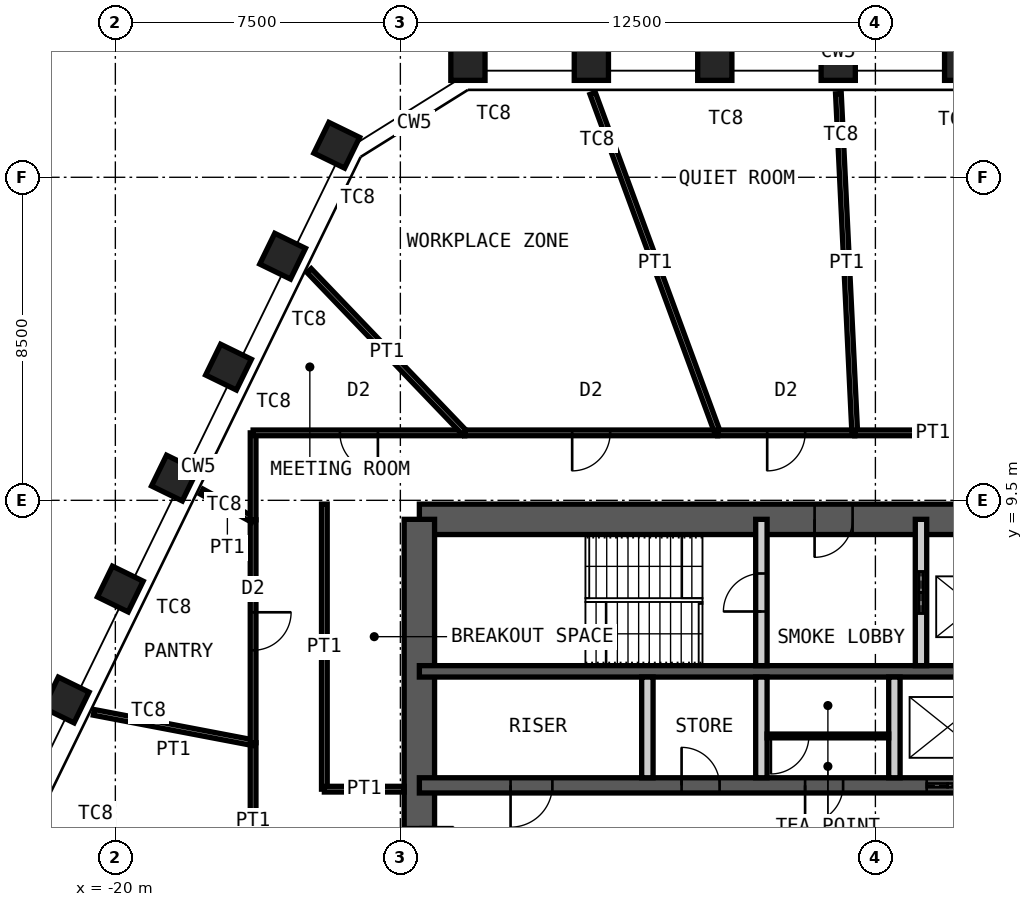
"""IFC4 building model, lengths in metres.
Left out: names, types, materials, properties, quantities, classifications, styles, units other than length and angle.
Written with IfcOpenShell. Run it as: python <this file> out.ifc"""

import sys

from ifc_helpers import new_model, si_unit, direction, frame, frame_2d, origin, origin_2d, place, context, subcontext, project, spatial, rectangle, hollow_rectangle, extrude, element, fill, save


model = new_model("IFC4")
c1 = context("Model", 3, precision=1e-05, world=origin(), true_north=direction((0.0, 1.0)))
c2 = subcontext(c1, "Body", "Model", "MODEL_VIEW")
j1 = project(units=[si_unit("LENGTHUNIT", "METRE"), si_unit("PLANEANGLEUNIT", "RADIAN")], contexts=[c1])
p1 = place(None, origin())
s1 = spatial("IfcSite", under=j1, at=p1, CompositionType="ELEMENT")
p2 = place(p1, origin())
s2 = spatial("IfcBuilding", under=s1, at=p2, CompositionType="ELEMENT")
p3 = place(p2, frame((0.0, 0.0, 304.0)))
s3 = spatial("IfcBuildingStorey", under=s2, at=p3, CompositionType="ELEMENT", Elevation=304.0)
for number, where, z_axis, x_axis in (
    (1, (-10.722, 21.0, 0.0), (0.0, 0.0, 1.0), (-1.0, 0.0, 0.0)),
    (2, (-7.474, 21.0, 0.0), (0.0, 0.0, 1.0), (-1.0, 0.0, 0.0)),
    (3, (-4.226, 21.0, 0.0), (0.0, 0.0, 1.0), (-1.0, 0.0, 0.0)),
    (4, (-0.978, 21.0, 0.0), (0.0, 0.0, 1.0), (-1.0, 0.0, 0.0)),
    (5, (2.27, 21.0, 0.0), (0.0, 0.0, 1.0), (-1.0, 0.0, 0.0)),
    (6, (-21.293, 4.246, 0.0), (0.0, 0.0, 1.0), (-0.438, -0.899, 0.0)),
    (7, (-19.87, 7.166, 0.0), (0.0, 0.0, 1.0), (-0.438, -0.899, 0.0)),
    (8, (-18.446, 10.085, 0.0), (0.0, 0.0, 1.0), (-0.438, -0.899, 0.0)),
    (9, (-17.022, 13.004, 0.0), (0.0, 0.0, 1.0), (-0.438, -0.899, 0.0)),
    (10, (-15.598, 15.924, 0.0), (0.0, 0.0, 1.0), (-0.438, -0.899, 0.0)),
    (11, (-14.174, 18.843, 0.0), (0.0, 0.0, 1.0), (-0.438, -0.899, 0.0)),
):
    element("IfcColumn", number, at=place(p3, frame(where, z_axis=z_axis, x_axis=x_axis)), inside=s3, PredefinedType="COLUMN", context=c2, shape_type="SweptSolid", body=[
        extrude(hollow_rectangle(XDim=0.9, YDim=0.9, WallThickness=0.05, at=origin_2d()), origin(), (0.0, 0.0, 1.0), 4.2),
    ])
p4 = place(p3, frame((-12.0, 9.0, 0.0), z_axis=(0.0, 0.0, 1.0), x_axis=(1.0, 0.0, 0.0)))
e12 = element("IfcWall", 12, at=p4, inside=s3, PredefinedType="SHEAR", context=c2, shape_type="SweptSolid", body=[
    extrude(rectangle(XDim=24.0, YDim=0.8, at=frame_2d((12.0, 0.0))), origin(), (0.0, 0.0, 1.0), 4.2),
])
p5 = place(p4, frame((10.4, 0.0, 0.0)))
e13 = element("IfcOpeningElement", 13, at=p5, cuts=e12, PredefinedType="OPENING", context=c2, shape_type="SweptSolid", body=[
    extrude(rectangle(XDim=1.0, YDim=2.1, at=frame_2d((0.5, 1.05))), frame((0.0, 0.41, 0.0), z_axis=(0.0, -1.0, 0.0), x_axis=(1.0, 0.0, 0.0)), (0.0, 0.0, 1.0), 0.82),
])
p6 = place(p4, frame((17.6, 0.0, 0.0)))
e14 = element("IfcOpeningElement", 14, at=p6, cuts=e12, PredefinedType="OPENING", context=c2, shape_type="SweptSolid", body=[
    extrude(rectangle(XDim=0.9, YDim=2.1, at=frame_2d((0.45, 1.05))), frame((0.0, 0.41, 0.0), z_axis=(0.0, -1.0, 0.0), x_axis=(1.0, 0.0, 0.0)), (0.0, 0.0, 1.0), 0.82),
])
p7 = place(p4, frame((21.9, 0.0, 0.0)))
e15 = element("IfcOpeningElement", 15, at=p7, cuts=e12, PredefinedType="OPENING", context=c2, shape_type="SweptSolid", body=[
    extrude(rectangle(XDim=0.9, YDim=2.1, at=frame_2d((0.45, 1.05))), frame((0.0, 0.41, 0.0), z_axis=(0.0, -1.0, 0.0), x_axis=(1.0, 0.0, 0.0)), (0.0, 0.0, 1.0), 0.82),
])
p8 = place(p3, frame((-12.0, -9.0, 0.0), z_axis=(0.0, 0.0, 1.0), x_axis=(0.0, 1.0, 0.0)))
e16 = element("IfcWall", 16, at=p8, inside=s3, PredefinedType="SHEAR", context=c2, shape_type="SweptSolid", body=[
    extrude(rectangle(XDim=18.0, YDim=0.8, at=frame_2d((9.0, 0.0))), origin(), (0.0, 0.0, 1.0), 4.2),
])
p9 = place(p8, frame((8.1, 0.0, 0.0)))
e17 = element("IfcOpeningElement", 17, at=p9, cuts=e16, PredefinedType="OPENING", context=c2, shape_type="SweptSolid", body=[
    extrude(rectangle(XDim=1.8, YDim=2.1, at=frame_2d((0.9, 1.05))), frame((0.0, 0.41, 0.0), z_axis=(0.0, -1.0, 0.0), x_axis=(1.0, 0.0, 0.0)), (0.0, 0.0, 1.0), 0.82),
])
p10 = place(p3, frame((-12.0, 5.0, 0.0), z_axis=(0.0, 0.0, 1.0), x_axis=(1.0, 0.0, 0.0)))
e18 = element("IfcWall", 18, at=p10, inside=s3, PredefinedType="SHEAR", context=c2, shape_type="SweptSolid", body=[
    extrude(rectangle(XDim=24.0, YDim=0.3, at=frame_2d((12.0, 0.0))), origin(), (0.0, 0.0, 1.0), 4.2),
])
p11 = place(p3, frame((-12.0, 2.0, 0.0), z_axis=(0.0, 0.0, 1.0), x_axis=(1.0, 0.0, 0.0)))
e19 = element("IfcWall", 19, at=p11, inside=s3, PredefinedType="SHEAR", context=c2, shape_type="SweptSolid", body=[
    extrude(rectangle(XDim=24.0, YDim=0.4, at=frame_2d((12.0, 0.0))), origin(), (0.0, 0.0, 1.0), 4.2),
])
p12 = place(p11, frame((2.4, 0.0, 0.0)))
e20 = element("IfcOpeningElement", 20, at=p12, cuts=e19, PredefinedType="OPENING", context=c2, shape_type="SweptSolid", body=[
    extrude(rectangle(XDim=1.1, YDim=2.1, at=frame_2d((0.55, 1.05))), frame((0.0, 0.21, 0.0), z_axis=(0.0, -1.0, 0.0), x_axis=(1.0, 0.0, 0.0)), (0.0, 0.0, 1.0), 0.42),
])
p13 = place(p11, frame((22.0, 0.0, 0.0)))
e21 = element("IfcOpeningElement", 21, at=p13, cuts=e19, PredefinedType="OPENING", context=c2, shape_type="SweptSolid", body=[
    extrude(rectangle(XDim=1.1, YDim=2.1, at=frame_2d((0.55, 1.05))), frame((0.0, 0.21, 0.0), z_axis=(0.0, -1.0, 0.0), x_axis=(1.0, 0.0, 0.0)), (0.0, 0.0, 1.0), 0.42),
])
p14 = place(p11, frame((10.15, 0.0, 0.0)))
e22 = element("IfcOpeningElement", 22, at=p14, cuts=e19, PredefinedType="OPENING", context=c2, shape_type="SweptSolid", body=[
    extrude(rectangle(XDim=1.0, YDim=2.1, at=frame_2d((0.5, 1.05))), frame((0.0, 0.21, 0.0), z_axis=(0.0, -1.0, 0.0), x_axis=(1.0, 0.0, 0.0)), (0.0, 0.0, 1.0), 0.42),
])
p15 = place(p11, frame((6.9, 0.0, 0.0)))
e23 = element("IfcOpeningElement", 23, at=p15, cuts=e19, PredefinedType="OPENING", context=c2, shape_type="SweptSolid", body=[
    extrude(rectangle(XDim=1.0, YDim=2.1, at=frame_2d((0.5, 1.05))), frame((0.0, 0.21, 0.0), z_axis=(0.0, -1.0, 0.0), x_axis=(1.0, 0.0, 0.0)), (0.0, 0.0, 1.0), 0.42),
])
p16 = place(p11, frame((13.35, 0.0, 0.0)))
e24 = element("IfcOpeningElement", 24, at=p16, cuts=e19, PredefinedType="OPENING", context=c2, shape_type="SweptSolid", body=[
    extrude(rectangle(XDim=1.1, YDim=2.4, at=frame_2d((0.55, 1.2))), frame((0.0, 0.21, 0.0), z_axis=(0.0, -1.0, 0.0), x_axis=(1.0, 0.0, 0.0)), (0.0, 0.0, 1.0), 0.42),
])
p17 = place(p11, frame((16.15, 0.0, 0.0)))
e25 = element("IfcOpeningElement", 25, at=p17, cuts=e19, PredefinedType="OPENING", context=c2, shape_type="SweptSolid", body=[
    extrude(rectangle(XDim=1.1, YDim=2.4, at=frame_2d((0.55, 1.2))), frame((0.0, 0.21, 0.0), z_axis=(0.0, -1.0, 0.0), x_axis=(1.0, 0.0, 0.0)), (0.0, 0.0, 1.0), 0.42),
])
p18 = place(p11, frame((19.0, 0.0, 0.0)))
e26 = element("IfcOpeningElement", 26, at=p18, cuts=e19, PredefinedType="OPENING", context=c2, shape_type="SweptSolid", body=[
    extrude(rectangle(XDim=1.0, YDim=2.1, at=frame_2d((0.5, 1.05))), frame((0.0, 0.21, 0.0), z_axis=(0.0, -1.0, 0.0), x_axis=(1.0, 0.0, 0.0)), (0.0, 0.0, 1.0), 0.42),
])
p19 = place(p3, frame((-3.0, 5.15, 0.0), z_axis=(0.0, 0.0, 1.0), x_axis=(0.0, 1.0, 0.0)))
e27 = element("IfcWall", 27, at=p19, inside=s3, PredefinedType="PARTITIONING", context=c2, shape_type="SweptSolid", body=[
    extrude(rectangle(XDim=3.85, YDim=0.3, at=frame_2d((1.925, 0.0))), origin(), (0.0, 0.0, 1.0), 3.98),
])
p20 = place(p19, frame((1.425, 0.0, 0.0)))
e28 = element("IfcOpeningElement", 28, at=p20, cuts=e27, PredefinedType="OPENING", context=c2, shape_type="SweptSolid", body=[
    extrude(rectangle(XDim=1.0, YDim=2.1, at=frame_2d((0.5, 1.05))), frame((0.0, 0.16, 0.0), z_axis=(0.0, -1.0, 0.0), x_axis=(1.0, 0.0, 0.0)), (0.0, 0.0, 1.0), 0.32),
])
p21 = place(p3, frame((1.2, 5.15, 0.0), z_axis=(0.0, 0.0, 1.0), x_axis=(0.0, 1.0, 0.0)))
e29 = element("IfcWall", 29, at=p21, inside=s3, PredefinedType="PARTITIONING", context=c2, shape_type="SweptSolid", body=[
    extrude(rectangle(XDim=3.85, YDim=0.3, at=frame_2d((1.925, 0.0))), origin(), (0.0, 0.0, 1.0), 3.98),
])
p22 = place(p21, frame((1.375, 0.0, 0.0)))
e30 = element("IfcOpeningElement", 30, at=p22, cuts=e29, PredefinedType="OPENING", context=c2, shape_type="SweptSolid", body=[
    extrude(rectangle(XDim=1.1, YDim=2.4, at=frame_2d((0.55, 1.2))), frame((0.0, 0.16, 0.0), z_axis=(0.0, -1.0, 0.0), x_axis=(1.0, 0.0, 0.0)), (0.0, 0.0, 1.0), 0.32),
])
for number, where, z_axis, x_axis in (
    (31, (-6.0, 2.2, 0.0), (0.0, 0.0, 1.0), (0.0, 1.0, 0.0)),
    (32, (-3.0, 2.2, 0.0), (0.0, 0.0, 1.0), (0.0, 1.0, 0.0)),
    (33, (0.5, 2.2, 0.0), (0.0, 0.0, 1.0), (0.0, 1.0, 0.0)),
):
    element("IfcWall", number, at=place(p3, frame(where, z_axis=z_axis, x_axis=x_axis)), inside=s3, PredefinedType="PARTITIONING", context=c2, shape_type="SweptSolid", body=[
        extrude(rectangle(XDim=2.65, YDim=0.3, at=frame_2d((1.325, 0.0))), origin(), (0.0, 0.0, 1.0), 3.98),
    ])
p23 = place(p3, frame((-2.85, 3.3, 0.0), z_axis=(0.0, 0.0, 1.0), x_axis=(1.0, 0.0, 0.0)))
e34 = element("IfcWall", 34, at=p23, inside=s3, PredefinedType="PARTITIONING", context=c2, shape_type="SweptSolid", body=[
    extrude(rectangle(XDim=3.2, YDim=0.1, at=frame_2d((1.6, 0.0))), origin(), (0.0, 0.0, 1.0), 3.98),
])
p24 = place(p23, frame((0.1, 0.0, 0.0)))
e35 = element("IfcOpeningElement", 35, at=p24, cuts=e34, PredefinedType="OPENING", context=c2, shape_type="SweptSolid", body=[
    extrude(rectangle(XDim=1.0, YDim=2.4, at=frame_2d((0.5, 1.2))), frame((0.0, 0.06, 0.0), z_axis=(0.0, -1.0, 0.0), x_axis=(1.0, 0.0, 0.0)), (0.0, 0.0, 1.0), 0.12),
])
p25 = place(p3, frame((-16.375, -7.161, 0.0), z_axis=(0.0, 0.0, 1.0), x_axis=(0.0, 1.0, 0.0)))
e36 = element("IfcWall", 36, at=p25, inside=s3, PredefinedType="PARTITIONING", context=c2, shape_type="SweptSolid", body=[
    extrude(rectangle(XDim=10.283, YDim=0.15, at=frame_2d((5.141, 0.0))), origin(), (0.0, 0.0, 1.0), 4.03),
])
p26 = place(p25, frame((4.241, 0.0, 0.0)))
e37 = element("IfcOpeningElement", 37, at=p26, cuts=e36, PredefinedType="OPENING", context=c2, shape_type="SweptSolid", body=[
    extrude(rectangle(XDim=1.8, YDim=2.4, at=frame_2d((0.9, 1.2))), frame((0.0, 0.085, 0.0), z_axis=(0.0, -1.0, 0.0), x_axis=(1.0, 0.0, 0.0)), (0.0, 0.0, 1.0), 0.17),
])
p27 = place(p3, frame((-20.566, 3.921, 0.0), z_axis=(0.0, 0.0, 1.0), x_axis=(0.982305997167, -0.187283015595, 0.0)))
e38 = element("IfcWall", 38, at=p27, inside=s3, PredefinedType="PARTITIONING", context=c2, shape_type="SweptSolid", body=[
    extrude(rectangle(XDim=4.267, YDim=0.15, at=frame_2d((2.133, 0.0))), origin(), (0.0, 0.0, 1.0), 3.33),
])
p28 = place(p3, frame((-16.375, 3.122, 0.0), z_axis=(0.0, 0.0, 1.0), x_axis=(0.0, 1.0, 0.0)))
e39 = element("IfcWall", 39, at=p28, inside=s3, PredefinedType="PARTITIONING", context=c2, shape_type="SweptSolid", body=[
    extrude(rectangle(XDim=5.865, YDim=0.15, at=frame_2d((2.933, 0.0))), origin(), (0.0, 0.0, 1.0), 4.03),
])
p29 = place(p28, frame((2.433, 0.0, 0.0)))
e40 = element("IfcOpeningElement", 40, at=p29, cuts=e39, PredefinedType="OPENING", context=c2, shape_type="SweptSolid", body=[
    extrude(rectangle(XDim=1.0, YDim=2.4, at=frame_2d((0.5, 1.2))), frame((0.0, 0.085, 0.0), z_axis=(0.0, -1.0, 0.0), x_axis=(1.0, 0.0, 0.0)), (0.0, 0.0, 1.0), 0.17),
])
p30 = place(p3, frame((-17.729, 9.73, 0.0), z_axis=(0.0, 0.0, 1.0), x_axis=(0.876636074137, -0.48115402266, 0.0)))
e41 = element("IfcWall", 41, at=p30, inside=s3, PredefinedType="PARTITIONING", context=c2, shape_type="SweptSolid", body=[
    extrude(rectangle(XDim=1.544, YDim=0.15, at=frame_2d((0.772, 0.0))), origin(), (0.0, 0.0, 1.0), 3.33),
])
p31 = place(p3, frame((-16.375, 8.987, 0.0), z_axis=(0.0, 0.0, 1.0), x_axis=(0.0, 1.0, 0.0)))
e42 = element("IfcWall", 42, at=p31, inside=s3, PredefinedType="PARTITIONING", context=c2, shape_type="SweptSolid", body=[
    extrude(rectangle(XDim=2.288, YDim=0.15, at=frame_2d((1.144, 0.0))), origin(), (0.0, 0.0, 1.0), 4.03),
])
p32 = place(p3, frame((-16.375, 11.275, 0.0), z_axis=(0.0, 0.0, 1.0), x_axis=(1.0, 0.0, 0.0)))
e43 = element("IfcWall", 43, at=p32, inside=s3, PredefinedType="PARTITIONING", context=c2, shape_type="SweptSolid", body=[
    extrude(rectangle(XDim=5.568, YDim=0.15, at=frame_2d((2.784, 0.0))), origin(), (0.0, 0.0, 1.0), 4.03),
])
p33 = place(p32, frame((2.284, 0.0, 0.0)))
e44 = element("IfcOpeningElement", 44, at=p33, cuts=e43, PredefinedType="OPENING", context=c2, shape_type="SweptSolid", body=[
    extrude(rectangle(XDim=1.0, YDim=2.4, at=frame_2d((0.5, 1.2))), frame((0.0, 0.085, 0.0), z_axis=(0.0, -1.0, 0.0), x_axis=(1.0, 0.0, 0.0)), (0.0, 0.0, 1.0), 0.17),
])
p34 = place(p3, frame((-14.9, 15.544, 0.0), z_axis=(0.0, 0.0, 1.0), x_axis=(0.691984258941, -0.72191258846, 0.0)))
e45 = element("IfcWall", 45, at=p34, inside=s3, PredefinedType="PARTITIONING", context=c2, shape_type="SweptSolid", body=[
    extrude(rectangle(XDim=5.914, YDim=0.15, at=frame_2d((2.957, 0.0))), origin(), (0.0, 0.0, 1.0), 4.03),
])
p35 = place(p3, frame((-10.807, 11.275, 0.0), z_axis=(0.0, 0.0, 1.0), x_axis=(1.0, 0.0, 0.0)))
e46 = element("IfcWall", 46, at=p35, inside=s3, PredefinedType="PARTITIONING", context=c2, shape_type="SweptSolid", body=[
    extrude(rectangle(XDim=6.656, YDim=0.15, at=frame_2d((3.328, 0.0))), origin(), (0.0, 0.0, 1.0), 4.03),
])
p36 = place(p35, frame((2.828, 0.0, 0.0)))
e47 = element("IfcOpeningElement", 47, at=p36, cuts=e46, PredefinedType="OPENING", context=c2, shape_type="SweptSolid", body=[
    extrude(rectangle(XDim=1.0, YDim=2.4, at=frame_2d((0.5, 1.2))), frame((0.0, 0.085, 0.0), z_axis=(0.0, -1.0, 0.0), x_axis=(1.0, 0.0, 0.0)), (0.0, 0.0, 1.0), 0.17),
])
p37 = place(p3, frame((-7.44, 20.206, 0.0), z_axis=(0.0, 0.0, 1.0), x_axis=(0.345511582319, -0.93841448544, 0.0)))
e48 = element("IfcWall", 48, at=p37, inside=s3, PredefinedType="PARTITIONING", context=c2, shape_type="SweptSolid", body=[
    extrude(rectangle(XDim=9.517, YDim=0.15, at=frame_2d((4.759, 0.0))), origin(), (0.0, 0.0, 1.0), 3.33),
])
p38 = place(p3, frame((-4.151, 11.275, 0.0), z_axis=(0.0, 0.0, 1.0), x_axis=(1.0, 0.0, 0.0)))
e49 = element("IfcWall", 49, at=p38, inside=s3, PredefinedType="PARTITIONING", context=c2, shape_type="SweptSolid", body=[
    extrude(rectangle(XDim=3.608, YDim=0.15, at=frame_2d((1.804, 0.0))), origin(), (0.0, 0.0, 1.0), 4.03),
])
p39 = place(p38, frame((1.304, 0.0, 0.0)))
e50 = element("IfcOpeningElement", 50, at=p39, cuts=e49, PredefinedType="OPENING", context=c2, shape_type="SweptSolid", body=[
    extrude(rectangle(XDim=1.0, YDim=2.4, at=frame_2d((0.5, 1.2))), frame((0.0, 0.085, 0.0), z_axis=(0.0, -1.0, 0.0), x_axis=(1.0, 0.0, 0.0)), (0.0, 0.0, 1.0), 0.17),
])
p40 = place(p3, frame((-0.973, 20.2, 0.0), z_axis=(0.0, 0.0, 1.0), x_axis=(0.04814150135, -0.998840525734, 0.0)))
e51 = element("IfcWall", 51, at=p40, inside=s3, PredefinedType="PARTITIONING", context=c2, shape_type="SweptSolid", body=[
    extrude(rectangle(XDim=8.936, YDim=0.15, at=frame_2d((4.468, 0.0))), origin(), (0.0, 0.0, 1.0), 3.33),
])
p41 = place(p3, frame((-0.543, 11.275, 0.0), z_axis=(0.0, 0.0, 1.0), x_axis=(1.0, 0.0, 0.0)))
e52 = element("IfcWall", 52, at=p41, inside=s3, PredefinedType="PARTITIONING", context=c2, shape_type="SweptSolid", body=[
    extrude(rectangle(XDim=10.273, YDim=0.15, at=frame_2d((5.137, 0.0))), origin(), (0.0, 0.0, 1.0), 4.03),
])
p42 = place(p41, frame((4.237, 0.0, 0.0)))
e53 = element("IfcOpeningElement", 53, at=p42, cuts=e52, PredefinedType="OPENING", context=c2, shape_type="SweptSolid", body=[
    extrude(rectangle(XDim=1.8, YDim=2.4, at=frame_2d((0.9, 1.2))), frame((0.0, 0.085, 0.0), z_axis=(0.0, -1.0, 0.0), x_axis=(1.0, 0.0, 0.0)), (0.0, 0.0, 1.0), 0.17),
])
p43 = place(p3, frame((-14.5, 1.9, 0.0), z_axis=(0.0, 0.0, 1.0), x_axis=(0.0, 1.0, 0.0)))
e54 = element("IfcWall", 54, at=p43, inside=s3, PredefinedType="PARTITIONING", context=c2, shape_type="SweptSolid", body=[
    extrude(rectangle(XDim=7.5, YDim=0.15, at=frame_2d((3.75, 0.0))), origin(), (0.0, 0.0, 1.0), 4.03),
])
p44 = place(p3, frame((-12.4, 1.9, 0.0), z_axis=(0.0, 0.0, 1.0), x_axis=(-1.0, 0.0, 0.0)))
e55 = element("IfcWall", 55, at=p44, inside=s3, PredefinedType="PARTITIONING", context=c2, shape_type="SweptSolid", body=[
    extrude(rectangle(XDim=2.1, YDim=0.15, at=frame_2d((1.05, 0.0))), origin(), (0.0, 0.0, 1.0), 3.53),
])
p45 = place(p5, origin())
e56 = element("IfcDoor", 56, at=p45, inside=s3, OperationType="SINGLE_SWING_LEFT", PredefinedType="DOOR", context=c2, shape_type="SweptSolid", body=[
    extrude(rectangle(XDim=1.0, YDim=2.1, at=frame_2d((0.5, 1.05))), frame((0.0, 0.025, 0.0), z_axis=(0.0, -1.0, 0.0), x_axis=(1.0, 0.0, 0.0)), (0.0, 0.0, 1.0), 0.05),
])
fill(e13, e56)
p46 = place(p20, origin())
e57 = element("IfcDoor", 57, at=p46, inside=s3, OperationType="SINGLE_SWING_RIGHT", PredefinedType="DOOR", context=c2, shape_type="SweptSolid", body=[
    extrude(rectangle(XDim=1.0, YDim=2.1, at=frame_2d((0.5, 1.05))), frame((0.0, 0.025, 0.0), z_axis=(0.0, -1.0, 0.0), x_axis=(1.0, 0.0, 0.0)), (0.0, 0.0, 1.0), 0.05),
])
fill(e28, e57)
p47 = place(p12, origin())
e58 = element("IfcDoor", 58, at=p47, inside=s3, OperationType="SINGLE_SWING_LEFT", PredefinedType="DOOR", context=c2, shape_type="SweptSolid", body=[
    extrude(rectangle(XDim=1.1, YDim=2.1, at=frame_2d((0.55, 1.05))), frame((0.0, 0.025, 0.0), z_axis=(0.0, -1.0, 0.0), x_axis=(1.0, 0.0, 0.0)), (0.0, 0.0, 1.0), 0.05),
])
fill(e20, e58)
p48 = place(p14, origin())
e59 = element("IfcDoor", 59, at=p48, inside=s3, OperationType="SINGLE_SWING_LEFT", PredefinedType="DOOR", context=c2, shape_type="SweptSolid", body=[
    extrude(rectangle(XDim=1.0, YDim=2.1, at=frame_2d((0.5, 1.05))), frame((0.0, 0.025, 0.0), z_axis=(0.0, -1.0, 0.0), x_axis=(1.0, 0.0, 0.0)), (0.0, 0.0, 1.0), 0.05),
])
fill(e22, e59)
p49 = place(p9, origin())
e60 = element("IfcDoor", 60, at=p49, inside=s3, OperationType="DOUBLE_DOOR_DOUBLE_SWING", PredefinedType="DOOR", context=c2, shape_type="SweptSolid", body=[
    extrude(rectangle(XDim=1.8, YDim=2.1, at=frame_2d((0.9, 1.05))), frame((0.0, 0.025, 0.0), z_axis=(0.0, -1.0, 0.0), x_axis=(1.0, 0.0, 0.0)), (0.0, 0.0, 1.0), 0.05),
])
fill(e17, e60)
p50 = place(p22, origin())
e61 = element("IfcDoor", 61, at=p50, inside=s3, OperationType="DOUBLE_DOOR_SLIDING", PredefinedType="DOOR", context=c2, shape_type="SweptSolid", body=[
    extrude(rectangle(XDim=1.1, YDim=2.4, at=frame_2d((0.55, 1.2))), frame((0.0, 0.025, 0.0), z_axis=(0.0, -1.0, 0.0), x_axis=(1.0, 0.0, 0.0)), (0.0, 0.0, 1.0), 0.05),
])
fill(e30, e61)
p51 = place(p15, origin())
e62 = element("IfcDoor", 62, at=p51, inside=s3, OperationType="SINGLE_SWING_RIGHT", PredefinedType="DOOR", context=c2, shape_type="SweptSolid", body=[
    extrude(rectangle(XDim=1.0, YDim=2.1, at=frame_2d((0.5, 1.05))), frame((0.0, 0.025, 0.0), z_axis=(0.0, -1.0, 0.0), x_axis=(1.0, 0.0, 0.0)), (0.0, 0.0, 1.0), 0.05),
])
fill(e23, e62)
p52 = place(p16, origin())
e63 = element("IfcDoor", 63, at=p52, inside=s3, OperationType="DOUBLE_DOOR_SLIDING", PredefinedType="DOOR", context=c2, shape_type="SweptSolid", body=[
    extrude(rectangle(XDim=1.1, YDim=2.4, at=frame_2d((0.55, 1.2))), frame((0.0, 0.025, 0.0), z_axis=(0.0, -1.0, 0.0), x_axis=(1.0, 0.0, 0.0)), (0.0, 0.0, 1.0), 0.05),
])
fill(e24, e63)
p53 = place(p24, origin())
e64 = element("IfcDoor", 64, at=p53, inside=s3, OperationType="SINGLE_SWING_LEFT", PredefinedType="DOOR", context=c2, shape_type="SweptSolid", body=[
    extrude(rectangle(XDim=1.0, YDim=2.4, at=frame_2d((0.5, 1.2))), frame((0.0, 0.025, 0.0), z_axis=(0.0, -1.0, 0.0), x_axis=(1.0, 0.0, 0.0)), (0.0, 0.0, 1.0), 0.05),
])
fill(e35, e64)
p54 = place(p29, origin())
e65 = element("IfcDoor", 65, at=p54, inside=s3, OperationType="SINGLE_SWING_RIGHT", PredefinedType="DOOR", context=c2, shape_type="SweptSolid", body=[
    extrude(rectangle(XDim=1.0, YDim=2.4, at=frame_2d((0.5, 1.2))), frame((0.0, 0.025, 0.0), z_axis=(0.0, -1.0, 0.0), x_axis=(1.0, 0.0, 0.0)), (0.0, 0.0, 1.0), 0.05),
])
fill(e40, e65)
p55 = place(p33, origin())
e66 = element("IfcDoor", 66, at=p55, inside=s3, OperationType="SINGLE_SWING_RIGHT", PredefinedType="DOOR", context=c2, shape_type="SweptSolid", body=[
    extrude(rectangle(XDim=1.0, YDim=2.4, at=frame_2d((0.5, 1.2))), frame((0.0, 0.025, 0.0), z_axis=(0.0, -1.0, 0.0), x_axis=(1.0, 0.0, 0.0)), (0.0, 0.0, 1.0), 0.05),
])
fill(e44, e66)
p56 = place(p36, origin())
e67 = element("IfcDoor", 67, at=p56, inside=s3, OperationType="SINGLE_SWING_LEFT", PredefinedType="DOOR", context=c2, shape_type="SweptSolid", body=[
    extrude(rectangle(XDim=1.0, YDim=2.4, at=frame_2d((0.5, 1.2))), frame((0.0, 0.025, 0.0), z_axis=(0.0, -1.0, 0.0), x_axis=(1.0, 0.0, 0.0)), (0.0, 0.0, 1.0), 0.05),
])
fill(e47, e67)
p57 = place(p39, origin())
e68 = element("IfcDoor", 68, at=p57, inside=s3, OperationType="SINGLE_SWING_LEFT", PredefinedType="DOOR", context=c2, shape_type="SweptSolid", body=[
    extrude(rectangle(XDim=1.0, YDim=2.4, at=frame_2d((0.5, 1.2))), frame((0.0, 0.025, 0.0), z_axis=(0.0, -1.0, 0.0), x_axis=(1.0, 0.0, 0.0)), (0.0, 0.0, 1.0), 0.05),
])
fill(e50, e68)
save(model, sys.argv[1])
